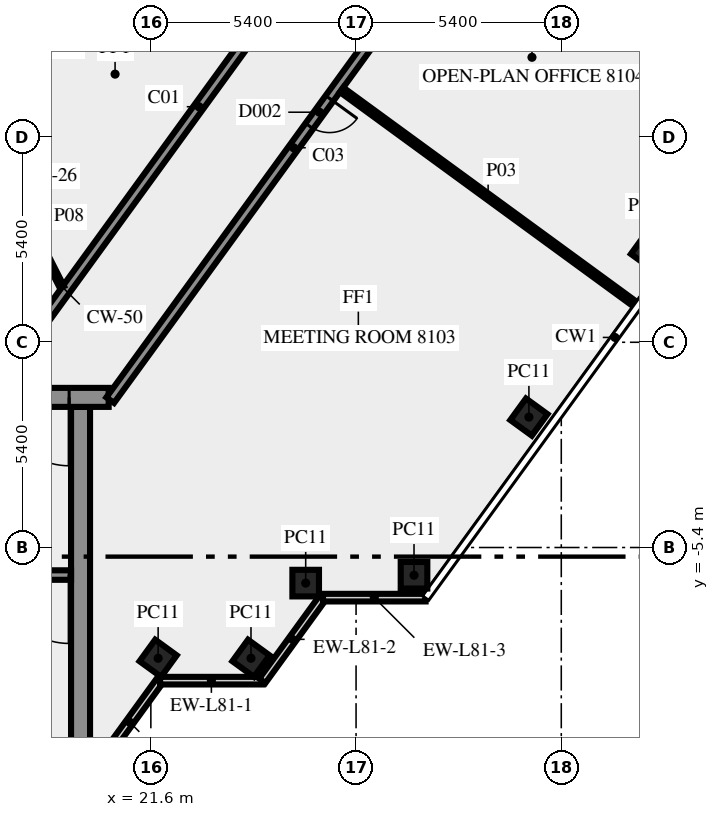
"""IFC4 building model, lengths in metres.
Left out: names, types, materials, properties, quantities, classifications, styles, units other than length and angle.
Written with IfcOpenShell. Run it as: python <this file> out.ifc"""

import sys

from ifc_helpers import new_model, si_unit, direction, frame, frame_2d, origin, origin_2d, place, context, subcontext, project, spatial, rectangle, extrude, element, fill, save


model = new_model("IFC4")
c1 = context("Model", 3, precision=1e-05, world=origin(), true_north=direction((0.0, 1.0)))
c2 = subcontext(c1, "Body", "Model", "MODEL_VIEW")
j1 = project(units=[si_unit("LENGTHUNIT", "METRE"), si_unit("PLANEANGLEUNIT", "RADIAN")], contexts=[c1])
p1 = place(None, origin())
s1 = spatial("IfcSite", under=j1, at=p1, CompositionType="ELEMENT")
p2 = place(p1, origin())
s2 = spatial("IfcBuilding", under=s1, at=p2, CompositionType="ELEMENT")
p3 = place(p2, frame((0.0, 0.0, 347.0)))
s3 = spatial("IfcBuildingStorey", under=s2, at=p3, CompositionType="ELEMENT", Elevation=347.0)
for number, where, z_axis, x_axis in (
    (1, (21.792, -8.315, 0.0), (0.0, 0.0, 1.0), (0.588, 0.809, 0.0)),
    (2, (24.235, -8.315, 0.0), (0.0, 0.0, 1.0), (0.588, 0.809, 0.0)),
    (3, (25.674, -6.337, 0.0), (0.0, 0.0, 1.0), (1.0, 0.0, 0.0)),
    (4, (28.525, -6.13, 0.0), (0.0, 0.0, 1.0), (1.0, 0.0, 0.0)),
    (5, (31.548, -1.969, 0.0), (0.0, 0.0, 1.0), (0.588, 0.809, 0.0)),
    (6, (34.722, 2.4, 0.0), (0.0, 0.0, 1.0), (0.588, 0.809, 0.0)),
):
    element("IfcColumn", number, at=place(p3, frame(where, z_axis=z_axis, x_axis=x_axis)), inside=s3, PredefinedType="COLUMN", context=c2, shape_type="SweptSolid", body=[
        extrude(rectangle(XDim=0.7, YDim=0.7, at=origin_2d()), origin(), (0.0, 0.0, 1.0), 3.65),
    ])
p4 = place(p3, frame((20.253, -11.083, 0.0), z_axis=(0.0, 0.0, 1.0), x_axis=(0.587766567315, 0.809030569476, 0.0)))
e7 = element("IfcWall", 7, at=p4, inside=s3, PredefinedType="SOLIDWALL", context=c2, shape_type="SweptSolid", body=[
    extrude(rectangle(XDim=2.688, YDim=0.2, at=frame_2d((1.344, 0.0))), origin(), (0.0, 0.0, 1.0), 3.65),
])
p5 = place(p3, frame((21.843, -8.904, 0.0), z_axis=(0.0, 0.0, 1.0), x_axis=(1.0, 0.0, 0.0)))
e8 = element("IfcWall", 8, at=p5, inside=s3, PredefinedType="SOLIDWALL", context=c2, shape_type="SweptSolid", body=[
    extrude(rectangle(XDim=2.7, YDim=0.2, at=frame_2d((1.35, 0.0))), origin(), (0.0, 0.0, 1.0), 3.65),
])
p6 = place(p3, frame((24.533, -8.909, 0.0), z_axis=(0.0, 0.0, 1.0), x_axis=(0.587720002413, 0.809064397168, 0.0)))
e9 = element("IfcWall", 9, at=p6, inside=s3, PredefinedType="SOLIDWALL", context=c2, shape_type="SweptSolid", body=[
    extrude(rectangle(XDim=2.7, YDim=0.2, at=frame_2d((1.35, 0.0))), origin(), (0.0, 0.0, 1.0), 3.65),
])
p7 = place(p3, frame((26.13, -6.719, 0.0), z_axis=(0.0, 0.0, 1.0), x_axis=(1.0, 0.0, 0.0)))
e10 = element("IfcWall", 10, at=p7, inside=s3, PredefinedType="SOLIDWALL", context=c2, shape_type="SweptSolid", body=[
    extrude(rectangle(XDim=2.7, YDim=0.2, at=frame_2d((1.35, 0.0))), origin(), (0.0, 0.0, 1.0), 3.65),
])
p8 = place(p3, frame((19.75, -10.5, 0.0), z_axis=(0.0, 0.0, 1.0), x_axis=(0.0, 1.0, 0.0)))
e11 = element("IfcWall", 11, at=p8, inside=s3, PredefinedType="SHEAR", context=c2, shape_type="SweptSolid", body=[
    extrude(rectangle(XDim=8.8, YDim=0.5, at=frame_2d((4.4, 0.0))), origin(), (0.0, 0.0, 1.0), 3.65),
])
p9 = place(p3, frame((19.5, -6.125, 0.0), z_axis=(0.0, 0.0, 1.0), x_axis=(-1.0, 0.0, 0.0)))
e12 = element("IfcWall", 12, at=p9, inside=s3, PredefinedType="SHEAR", context=c2, shape_type="SweptSolid", body=[
    extrude(rectangle(XDim=8.05, YDim=0.25, at=frame_2d((4.025, 0.0))), origin(), (0.0, 0.0, 1.0), 3.65),
])
p10 = place(p9, frame((0.05, 0.0, 0.0)))
e13 = element("IfcOpeningElement", 13, at=p10, cuts=e12, PredefinedType="OPENING", context=c2, shape_type="SweptSolid", body=[
    extrude(rectangle(XDim=1.8, YDim=2.1, at=frame_2d((0.9, 1.05))), frame((0.0, 0.135, 0.0), z_axis=(0.0, -1.0, 0.0), x_axis=(1.0, 0.0, 0.0)), (0.0, 0.0, 1.0), 0.27),
])
p11 = place(p3, frame((20.49, -1.45, 0.0), z_axis=(0.0, 0.0, 1.0), x_axis=(-1.0, 0.0, 0.0)))
e14 = element("IfcWall", 14, at=p11, inside=s3, PredefinedType="SHEAR", context=c2, shape_type="SweptSolid", body=[
    extrude(rectangle(XDim=40.98, YDim=0.5, at=frame_2d((20.49, 0.0))), origin(), (0.0, 0.0, 1.0), 3.65),
])
p12 = place(p11, frame((38.14, 0.0, 0.0)))
e15 = element("IfcOpeningElement", 15, at=p12, cuts=e14, PredefinedType="OPENING", context=c2, shape_type="SweptSolid", body=[
    extrude(rectangle(XDim=1.8, YDim=2.1, at=frame_2d((0.9, 1.05))), frame((0.0, 0.26, 0.0), z_axis=(0.0, -1.0, 0.0), x_axis=(1.0, 0.0, 0.0)), (0.0, 0.0, 1.0), 0.52),
])
p13 = place(p11, frame((36.728, 0.0, 0.0)))
e16 = element("IfcOpeningElement", 16, at=p13, cuts=e14, PredefinedType="OPENING", context=c2, shape_type="SweptSolid", body=[
    extrude(rectangle(XDim=0.8, YDim=2.1, at=frame_2d((0.4, 1.05))), frame((0.0, 0.26, 0.0), z_axis=(0.0, -1.0, 0.0), x_axis=(1.0, 0.0, 0.0)), (0.0, 0.0, 1.0), 0.52),
])
p14 = place(p11, frame((35.153, 0.0, 0.0)))
e17 = element("IfcOpeningElement", 17, at=p14, cuts=e14, PredefinedType="OPENING", context=c2, shape_type="SweptSolid", body=[
    extrude(rectangle(XDim=0.8, YDim=2.1, at=frame_2d((0.4, 1.05))), frame((0.0, 0.26, 0.0), z_axis=(0.0, -1.0, 0.0), x_axis=(1.0, 0.0, 0.0)), (0.0, 0.0, 1.0), 0.52),
])
p15 = place(p11, frame((32.94, 0.0, 0.0)))
e18 = element("IfcOpeningElement", 18, at=p15, cuts=e14, PredefinedType="OPENING", context=c2, shape_type="SweptSolid", body=[
    extrude(rectangle(XDim=0.9, YDim=2.1, at=frame_2d((0.45, 1.05))), frame((0.0, 0.26, 0.0), z_axis=(0.0, -1.0, 0.0), x_axis=(1.0, 0.0, 0.0)), (0.0, 0.0, 1.0), 0.52),
])
p16 = place(p11, frame((31.015, 0.0, 0.0)))
e19 = element("IfcOpeningElement", 19, at=p16, cuts=e14, PredefinedType="OPENING", context=c2, shape_type="SweptSolid", body=[
    extrude(rectangle(XDim=0.8, YDim=2.1, at=frame_2d((0.4, 1.05))), frame((0.0, 0.26, 0.0), z_axis=(0.0, -1.0, 0.0), x_axis=(1.0, 0.0, 0.0)), (0.0, 0.0, 1.0), 0.52),
])
p17 = place(p11, frame((24.765, 0.0, 0.0)))
e20 = element("IfcOpeningElement", 20, at=p17, cuts=e14, PredefinedType="OPENING", context=c2, shape_type="SweptSolid", body=[
    extrude(rectangle(XDim=0.8, YDim=2.1, at=frame_2d((0.4, 1.05))), frame((0.0, 0.26, 0.0), z_axis=(0.0, -1.0, 0.0), x_axis=(1.0, 0.0, 0.0)), (0.0, 0.0, 1.0), 0.52),
])
p18 = place(p11, frame((21.765, 0.0, 0.0)))
e21 = element("IfcOpeningElement", 21, at=p18, cuts=e14, PredefinedType="OPENING", context=c2, shape_type="SweptSolid", body=[
    extrude(rectangle(XDim=2.0, YDim=2.1, at=frame_2d((1.0, 1.05))), frame((0.0, 0.26, 0.0), z_axis=(0.0, -1.0, 0.0), x_axis=(1.0, 0.0, 0.0)), (0.0, 0.0, 1.0), 0.52),
])
p19 = place(p11, frame((14.002, 0.0, 0.0)))
e22 = element("IfcOpeningElement", 22, at=p19, cuts=e14, PredefinedType="OPENING", context=c2, shape_type="SweptSolid", body=[
    extrude(rectangle(XDim=0.9, YDim=2.1, at=frame_2d((0.45, 1.05))), frame((0.0, 0.26, 0.0), z_axis=(0.0, -1.0, 0.0), x_axis=(1.0, 0.0, 0.0)), (0.0, 0.0, 1.0), 0.52),
])
p20 = place(p11, frame((10.278, 0.0, 0.0)))
e23 = element("IfcOpeningElement", 23, at=p20, cuts=e14, PredefinedType="OPENING", context=c2, shape_type="SweptSolid", body=[
    extrude(rectangle(XDim=0.9, YDim=2.1, at=frame_2d((0.45, 1.05))), frame((0.0, 0.26, 0.0), z_axis=(0.0, -1.0, 0.0), x_axis=(1.0, 0.0, 0.0)), (0.0, 0.0, 1.0), 0.52),
])
p21 = place(p11, frame((7.14, 0.0, 0.0)))
e24 = element("IfcOpeningElement", 24, at=p21, cuts=e14, PredefinedType="OPENING", context=c2, shape_type="SweptSolid", body=[
    extrude(rectangle(XDim=0.9, YDim=2.1, at=frame_2d((0.45, 1.05))), frame((0.0, 0.26, 0.0), z_axis=(0.0, -1.0, 0.0), x_axis=(1.0, 0.0, 0.0)), (0.0, 0.0, 1.0), 0.52),
])
p22 = place(p11, frame((4.19, 0.0, 0.0)))
e25 = element("IfcOpeningElement", 25, at=p22, cuts=e14, PredefinedType="OPENING", context=c2, shape_type="SweptSolid", body=[
    extrude(rectangle(XDim=0.9, YDim=2.1, at=frame_2d((0.45, 1.05))), frame((0.0, 0.26, 0.0), z_axis=(0.0, -1.0, 0.0), x_axis=(1.0, 0.0, 0.0)), (0.0, 0.0, 1.0), 0.52),
])
p23 = place(p11, frame((1.04, 0.0, 0.0)))
e26 = element("IfcOpeningElement", 26, at=p23, cuts=e14, PredefinedType="OPENING", context=c2, shape_type="SweptSolid", body=[
    extrude(rectangle(XDim=1.8, YDim=2.1, at=frame_2d((0.9, 1.05))), frame((0.0, 0.26, 0.0), z_axis=(0.0, -1.0, 0.0), x_axis=(1.0, 0.0, 0.0)), (0.0, 0.0, 1.0), 0.52),
])
p24 = place(p3, frame((17.545, -1.125, 0.0), z_axis=(0.0, 0.0, 1.0), x_axis=(0.58779555165, 0.809009511354, 0.0)))
e27 = element("IfcWall", 27, at=p24, inside=s3, PredefinedType="SOLIDWALL", context=c2, shape_type="SweptSolid", body=[
    extrude(rectangle(XDim=18.103, YDim=0.25, at=frame_2d((9.052, 0.0))), origin(), (0.0, 0.0, 1.0), 3.65),
])
p25 = place(p24, frame((16.728, 0.0, 0.0)))
e28 = element("IfcOpeningElement", 28, at=p25, cuts=e27, PredefinedType="OPENING", context=c2, shape_type="SweptSolid", body=[
    extrude(rectangle(XDim=0.9, YDim=2.1, at=frame_2d((0.45, 1.05))), frame((0.0, 0.135, 0.0), z_axis=(0.0, -1.0, 0.0), x_axis=(1.0, 0.0, 0.0)), (0.0, 0.0, 1.0), 0.27),
])
p26 = place(p3, frame((30.183, 11.761, 0.0), z_axis=(0.0, 0.0, 1.0), x_axis=(-0.587781762867, -0.80901952958, 0.0)))
e29 = element("IfcWall", 29, at=p26, inside=s3, PredefinedType="SOLIDWALL", context=c2, shape_type="SweptSolid", body=[
    extrude(rectangle(XDim=16.42, YDim=0.25, at=frame_2d((8.21, 0.0))), origin(), (0.0, 0.0, 1.0), 3.65),
])
p27 = place(p26, frame((0.225, 0.0, 0.0)))
e30 = element("IfcOpeningElement", 30, at=p27, cuts=e29, PredefinedType="OPENING", context=c2, shape_type="SweptSolid", body=[
    extrude(rectangle(XDim=0.9, YDim=2.1, at=frame_2d((0.45, 1.05))), frame((0.0, 0.135, 0.0), z_axis=(0.0, -1.0, 0.0), x_axis=(1.0, 0.0, 0.0)), (0.0, 0.0, 1.0), 0.27),
])
p28 = place(p26, frame((6.605, 0.0, 0.0)))
e31 = element("IfcOpeningElement", 31, at=p28, cuts=e29, PredefinedType="OPENING", context=c2, shape_type="SweptSolid", body=[
    extrude(rectangle(XDim=0.9, YDim=2.1, at=frame_2d((0.45, 1.05))), frame((0.0, 0.135, 0.0), z_axis=(0.0, -1.0, 0.0), x_axis=(1.0, 0.0, 0.0)), (0.0, 0.0, 1.0), 0.27),
])
p29 = place(p3, frame((37.458, 6.76, 0.0), z_axis=(0.0, 0.0, 1.0), x_axis=(-0.809016295501, 0.587786214209, 0.0)))
e32 = element("IfcWall", 32, at=p29, inside=s3, PredefinedType="PARTITIONING", context=c2, shape_type="SweptSolid", body=[
    extrude(rectangle(XDim=8.7, YDim=0.15, at=frame_2d((4.35, 0.0))), origin(), (0.0, 0.0, 1.0), 3.65),
])
p30 = place(p3, frame((26.619, 6.643, 0.0), z_axis=(0.0, 0.0, 1.0), x_axis=(0.807594822539, -0.589737740532, 0.0)))
e33 = element("IfcWall", 33, at=p30, inside=s3, PredefinedType="PARTITIONING", context=c2, shape_type="SweptSolid", body=[
    extrude(rectangle(XDim=9.55, YDim=0.15, at=frame_2d((4.775, 0.0))), origin(), (0.0, 0.0, 1.0), 2.95),
])
p31 = place(p3, frame((18.0, 3.925, 0.0), z_axis=(0.0, 0.0, 1.0), x_axis=(0.453950796792, -0.891026752736, 0.0)))
e34 = element("IfcWall", 34, at=p31, inside=s3, PredefinedType="PARTITIONING", context=c2, shape_type="SweptSolid", body=[
    extrude(rectangle(XDim=2.778, YDim=0.12, at=frame_2d((1.389, 0.0))), origin(), (0.0, 0.0, 1.0), 3.65),
])
p32 = place(p10, origin())
e35 = element("IfcDoor", 35, at=p32, inside=s3, OperationType="DOUBLE_DOOR_SINGLE_SWING", PredefinedType="DOOR", context=c2, shape_type="SweptSolid", body=[
    extrude(rectangle(XDim=1.8, YDim=2.1, at=frame_2d((0.9, 1.05))), frame((0.0, 0.025, 0.0), z_axis=(0.0, -1.0, 0.0), x_axis=(1.0, 0.0, 0.0)), (0.0, 0.0, 1.0), 0.05),
])
fill(e13, e35)
p33 = place(p23, origin())
e36 = element("IfcDoor", 36, at=p33, inside=s3, OperationType="DOUBLE_DOOR_SINGLE_SWING", PredefinedType="DOOR", context=c2, shape_type="SweptSolid", body=[
    extrude(rectangle(XDim=1.8, YDim=2.1, at=frame_2d((0.9, 1.05))), frame((0.0, 0.025, 0.0), z_axis=(0.0, -1.0, 0.0), x_axis=(1.0, 0.0, 0.0)), (0.0, 0.0, 1.0), 0.05),
])
fill(e26, e36)
p34 = place(p28, origin())
e37 = element("IfcDoor", 37, at=p34, inside=s3, OperationType="SINGLE_SWING_LEFT", PredefinedType="DOOR", context=c2, shape_type="SweptSolid", body=[
    extrude(rectangle(XDim=0.9, YDim=2.1, at=frame_2d((0.45, 1.05))), frame((0.0, 0.025, 0.0), z_axis=(0.0, -1.0, 0.0), x_axis=(1.0, 0.0, 0.0)), (0.0, 0.0, 1.0), 0.05),
])
fill(e31, e37)
save(model, sys.argv[1])
